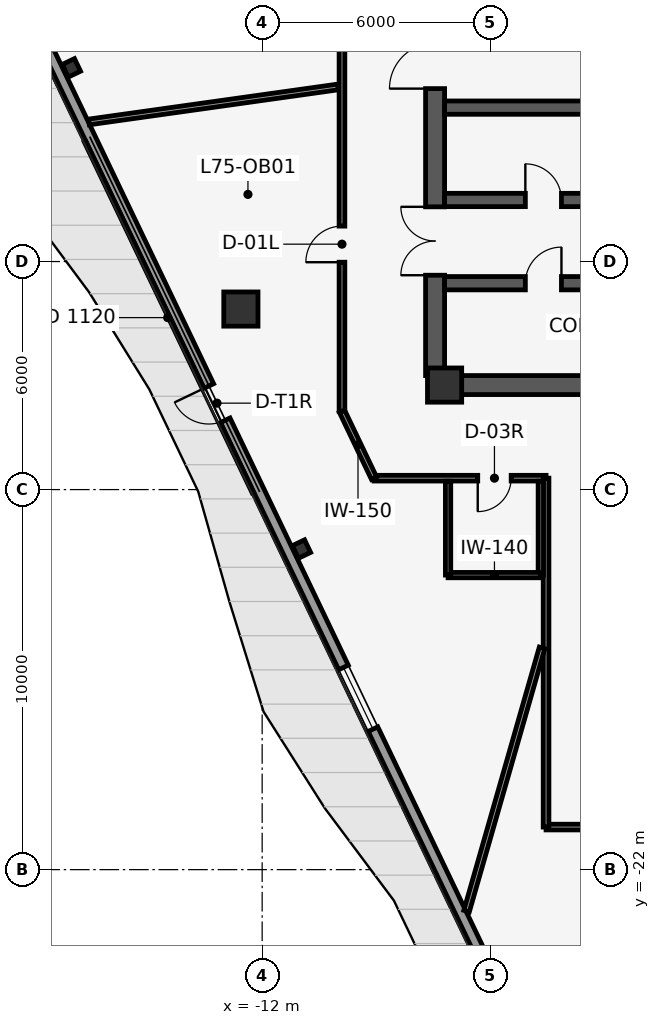
"""IFC4 building model, lengths in metres.
Left out: names, types, materials, properties, quantities, classifications, styles, units other than length and angle.
Written with IfcOpenShell. Run it as: python <this file> out.ifc"""

import sys

from ifc_helpers import new_model, si_unit, direction, frame, frame_2d, origin, origin_2d, place, context, subcontext, project, spatial, rectangle, i_section, extrude, element, fill, save


model = new_model("IFC4")
c1 = context("Model", 3, precision=1e-05, world=origin(), true_north=direction((0.0, 1.0)))
c2 = subcontext(c1, "Body", "Model", "MODEL_VIEW")
j1 = project(units=[si_unit("LENGTHUNIT", "METRE"), si_unit("PLANEANGLEUNIT", "RADIAN")], contexts=[c1])
p1 = place(None, origin())
s1 = spatial("IfcSite", under=j1, at=p1, CompositionType="ELEMENT")
p2 = place(p1, origin())
s2 = spatial("IfcBuilding", under=s1, at=p2, CompositionType="ELEMENT")
p3 = place(p2, frame((0.0, 0.0, 318.8)))
s3 = spatial("IfcBuildingStorey", under=s2, at=p3, CompositionType="ELEMENT", Elevation=318.8)
p4 = place(p3, frame((-7.45, -9.0, 0.0), z_axis=(0.0, 0.0, 1.0), x_axis=(0.0, 1.0, 0.0)))
e1 = element("IfcWall", 1, at=p4, inside=s3, PredefinedType="SHEAR", context=c2, shape_type="SweptSolid", body=[
    extrude(rectangle(XDim=9.1, YDim=0.5, at=frame_2d((4.55, 0.0))), origin(), (0.0, 0.0, 1.0), 4.32),
])
p5 = place(p4, frame((2.64, 0.0, 0.0)))
e2 = element("IfcOpeningElement", 2, at=p5, cuts=e1, PredefinedType="OPENING", context=c2, shape_type="SweptSolid", body=[
    extrude(rectangle(XDim=1.8, YDim=2.2, at=frame_2d((0.9, 1.1))), frame((0.0, 0.26, 0.0), z_axis=(0.0, -1.0, 0.0), x_axis=(1.0, 0.0, 0.0)), (0.0, 0.0, 1.0), 0.52),
])
p6 = place(p4, frame((7.55, 0.0, 0.0)))
e3 = element("IfcOpeningElement", 3, at=p6, cuts=e1, PredefinedType="OPENING", context=c2, shape_type="SweptSolid", body=[
    extrude(rectangle(XDim=1.2, YDim=2.15, at=frame_2d((0.6, 1.075))), frame((0.0, 0.26, 0.0), z_axis=(0.0, -1.0, 0.0), x_axis=(1.0, 0.0, 0.0)), (0.0, 0.0, 1.0), 0.52),
])
p7 = place(p3, frame((-7.45, -9.25, 0.0), z_axis=(0.0, 0.0, 1.0), x_axis=(1.0, 0.0, 0.0)))
e4 = element("IfcWall", 4, at=p7, inside=s3, PredefinedType="SHEAR", context=c2, shape_type="SweptSolid", body=[
    extrude(rectangle(XDim=14.9, YDim=0.5, at=frame_2d((7.45, 0.0))), origin(), (0.0, 0.0, 1.0), 4.32),
])
p8 = place(p3, frame((-7.2, -1.95, 0.0), z_axis=(0.0, 0.0, 1.0), x_axis=(1.0, 0.0, 0.0)))
e5 = element("IfcWall", 5, at=p8, inside=s3, PredefinedType="SHEAR", context=c2, shape_type="SweptSolid", body=[
    extrude(rectangle(XDim=14.4, YDim=0.35, at=frame_2d((7.2, 0.0))), origin(), (0.0, 0.0, 1.0), 4.32),
])
p9 = place(p3, frame((-7.2, -4.38, 0.0), z_axis=(0.0, 0.0, 1.0), x_axis=(1.0, 0.0, 0.0)))
e6 = element("IfcWall", 6, at=p9, inside=s3, PredefinedType="SHEAR", context=c2, shape_type="SweptSolid", body=[
    extrude(rectangle(XDim=14.4, YDim=0.35, at=frame_2d((7.2, 0.0))), origin(), (0.0, 0.0, 1.0), 4.32),
])
p10 = place(p9, frame((2.125, 0.0, 0.0)))
e7 = element("IfcOpeningElement", 7, at=p10, cuts=e6, PredefinedType="OPENING", context=c2, shape_type="SweptSolid", body=[
    extrude(rectangle(XDim=0.95, YDim=2.15, at=frame_2d((0.475, 1.075))), frame((0.0, 0.185, 0.0), z_axis=(0.0, -1.0, 0.0), x_axis=(1.0, 0.0, 0.0)), (0.0, 0.0, 1.0), 0.37),
])
p11 = place(p3, frame((-7.2, -6.57, 0.0), z_axis=(0.0, 0.0, 1.0), x_axis=(1.0, 0.0, 0.0)))
e8 = element("IfcWall", 8, at=p11, inside=s3, PredefinedType="SHEAR", context=c2, shape_type="SweptSolid", body=[
    extrude(rectangle(XDim=14.4, YDim=0.35, at=frame_2d((7.2, 0.0))), origin(), (0.0, 0.0, 1.0), 4.32),
])
p12 = place(p11, frame((9.05, 0.0, 0.0)))
e9 = element("IfcOpeningElement", 9, at=p12, cuts=e8, PredefinedType="OPENING", context=c2, shape_type="SweptSolid", body=[
    extrude(rectangle(XDim=1.2, YDim=2.25, at=frame_2d((0.6, 1.125))), frame((0.0, 0.185, 0.0), z_axis=(0.0, -1.0, 0.0), x_axis=(1.0, 0.0, 0.0)), (0.0, 0.0, 1.0), 0.37),
])
p13 = place(p11, frame((10.85, 0.0, 0.0)))
e10 = element("IfcOpeningElement", 10, at=p13, cuts=e8, PredefinedType="OPENING", context=c2, shape_type="SweptSolid", body=[
    extrude(rectangle(XDim=1.2, YDim=2.25, at=frame_2d((0.6, 1.125))), frame((0.0, 0.185, 0.0), z_axis=(0.0, -1.0, 0.0), x_axis=(1.0, 0.0, 0.0)), (0.0, 0.0, 1.0), 0.37),
])
p14 = place(p11, frame((2.125, 0.0, 0.0)))
e11 = element("IfcOpeningElement", 11, at=p14, cuts=e8, PredefinedType="OPENING", context=c2, shape_type="SweptSolid", body=[
    extrude(rectangle(XDim=0.95, YDim=2.15, at=frame_2d((0.475, 1.075))), frame((0.0, 0.185, 0.0), z_axis=(0.0, -1.0, 0.0), x_axis=(1.0, 0.0, 0.0)), (0.0, 0.0, 1.0), 0.37),
])
p15 = place(p11, frame((12.91, 0.0, 0.0)))
e12 = element("IfcOpeningElement", 12, at=p15, cuts=e8, PredefinedType="OPENING", context=c2, shape_type="SweptSolid", body=[
    extrude(rectangle(XDim=0.88, YDim=2.15, at=frame_2d((0.44, 1.075))), frame((0.0, 0.185, 0.0), z_axis=(0.0, -1.0, 0.0), x_axis=(1.0, 0.0, 0.0)), (0.0, 0.0, 1.0), 0.37),
])
for number, where, z_axis, x_axis in (
    (13, (-7.2, -9.25, 0.0), (0.0, 0.0, 1.0), (1.0, 0.0, 0.0)),
    (14, (-12.56, -7.25, 0.0), (0.0, 0.0, 1.0), (1.0, 0.0, 0.0)),
):
    element("IfcColumn", number, at=place(p3, frame(where, z_axis=z_axis, x_axis=x_axis)), inside=s3, PredefinedType="COLUMN", context=c2, shape_type="SweptSolid", body=[
        extrude(rectangle(XDim=0.9, YDim=0.9, at=origin_2d()), origin(), (0.0, 0.0, 1.0), 4.6),
    ])
for number, where, z_axis, x_axis in (
    (15, (-17.019, -0.903, 0.0), (0.0, 0.0, 1.0), (-0.431, 0.902, 0.0)),
    (16, (-10.966, -13.565, 0.0), (0.0, 0.0, 1.0), (-0.431, 0.902, 0.0)),
):
    element("IfcColumn", number, at=place(p3, frame(where, z_axis=z_axis, x_axis=x_axis)), inside=s3, PredefinedType="COLUMN", context=c2, shape_type="SweptSolid", body=[
        extrude(i_section(OverallWidth=0.368, OverallDepth=0.356, WebThickness=0.011, FlangeThickness=0.018, at=origin_2d()), origin(), (0.0, 0.0, 1.0), 4.6),
    ])
p16 = place(p3, frame((-4.988, -26.865, 0.0), z_axis=(0.0, 0.0, 1.0), x_axis=(-0.431592936847, 0.902068476815, 0.0)))
e17 = element("IfcWall", 17, at=p16, inside=s3, PredefinedType="STANDARD", context=c2, shape_type="SweptSolid", body=[
    extrude(rectangle(XDim=43.18, YDim=0.28, at=frame_2d((21.59, 0.0))), origin(), (0.0, 0.0, 1.0), 4.32),
])
p17 = place(p16, frame((18.499, 0.0, 0.0)))
e18 = element("IfcOpeningElement", 18, at=p17, cuts=e17, PredefinedType="OPENING", context=c2, shape_type="SweptSolid", body=[
    extrude(rectangle(XDim=1.0, YDim=2.15, at=frame_2d((0.5, 1.075))), frame((0.0, 0.15, 0.0), z_axis=(0.0, -1.0, 0.0), x_axis=(1.0, 0.0, 0.0)), (0.0, 0.0, 1.0), 0.3),
])
p18 = place(p16, frame((9.49, 0.0, 0.85)))
e19 = element("IfcOpeningElement", 19, at=p18, cuts=e17, PredefinedType="OPENING", context=c2, shape_type="SweptSolid", body=[
    extrude(rectangle(XDim=1.8, YDim=2.4, at=frame_2d((0.9, 1.2))), frame((0.0, 0.15, 0.0), z_axis=(0.0, -1.0, 0.0), x_axis=(1.0, 0.0, 0.0)), (0.0, 0.0, 1.0), 0.3),
])
p19 = place(p16, frame((31.89, 0.0, 0.85)))
e20 = element("IfcOpeningElement", 20, at=p19, cuts=e17, PredefinedType="OPENING", context=c2, shape_type="SweptSolid", body=[
    extrude(rectangle(XDim=1.8, YDim=2.4, at=frame_2d((0.9, 1.2))), frame((0.0, 0.15, 0.0), z_axis=(0.0, -1.0, 0.0), x_axis=(1.0, 0.0, 0.0)), (0.0, 0.0, 1.0), 0.3),
])
p20 = place(p16, frame((37.49, 0.0, 0.85)))
e21 = element("IfcOpeningElement", 21, at=p20, cuts=e17, PredefinedType="OPENING", context=c2, shape_type="SweptSolid", body=[
    extrude(rectangle(XDim=1.8, YDim=2.4, at=frame_2d((0.9, 1.2))), frame((0.0, 0.15, 0.0), z_axis=(0.0, -1.0, 0.0), x_axis=(1.0, 0.0, 0.0)), (0.0, 0.0, 1.0), 0.3),
])
p21 = place(p3, frame((-4.53, -11.7, 0.0), z_axis=(0.0, 0.0, 1.0), x_axis=(-1.0, 0.0, 0.0)))
e22 = element("IfcWall", 22, at=p21, inside=s3, PredefinedType="PARTITIONING", context=c2, shape_type="SweptSolid", body=[
    extrude(rectangle(XDim=4.526, YDim=0.15, at=frame_2d((2.263, 0.0))), origin(), (0.0, 0.0, 1.0), 4.32),
])
p22 = place(p21, frame((0.918, 0.0, 0.0)))
e23 = element("IfcOpeningElement", 23, at=p22, cuts=e22, PredefinedType="OPENING", context=c2, shape_type="SweptSolid", body=[
    extrude(rectangle(XDim=0.88, YDim=2.1, at=frame_2d((0.44, 1.05))), frame((0.0, 0.085, 0.0), z_axis=(0.0, -1.0, 0.0), x_axis=(1.0, 0.0, 0.0)), (0.0, 0.0, 1.0), 0.17),
])
p23 = place(p3, frame((-9.056, -11.7, 0.0), z_axis=(0.0, 0.0, 1.0), x_axis=(-0.431605782187, 0.902062330875, 0.0)))
e24 = element("IfcWall", 24, at=p23, inside=s3, PredefinedType="PARTITIONING", context=c2, shape_type="SweptSolid", body=[
    extrude(rectangle(XDim=1.954, YDim=0.15, at=frame_2d((0.977, 0.0))), origin(), (0.0, 0.0, 1.0), 4.32),
])
p24 = place(p3, frame((-9.9, -9.937, 0.0), z_axis=(0.0, 0.0, 1.0), x_axis=(0.0, 1.0, 0.0)))
e25 = element("IfcWall", 25, at=p24, inside=s3, PredefinedType="PARTITIONING", context=c2, shape_type="SweptSolid", body=[
    extrude(rectangle(XDim=21.787, YDim=0.15, at=frame_2d((10.894, 0.0))), origin(), (0.0, 0.0, 1.0), 4.32),
])
p25 = place(p24, frame((3.919, 0.0, 0.0)))
e26 = element("IfcOpeningElement", 26, at=p25, cuts=e25, PredefinedType="OPENING", context=c2, shape_type="SweptSolid", body=[
    extrude(rectangle(XDim=0.95, YDim=2.15, at=frame_2d((0.475, 1.075))), frame((0.0, 0.085, 0.0), z_axis=(0.0, -1.0, 0.0), x_axis=(1.0, 0.0, 0.0)), (0.0, 0.0, 1.0), 0.17),
])
p26 = place(p24, frame((14.558, 0.0, 0.0)))
e27 = element("IfcOpeningElement", 27, at=p26, cuts=e25, PredefinedType="OPENING", context=c2, shape_type="SweptSolid", body=[
    extrude(rectangle(XDim=0.95, YDim=2.15, at=frame_2d((0.475, 1.075))), frame((0.0, 0.085, 0.0), z_axis=(0.0, -1.0, 0.0), x_axis=(1.0, 0.0, 0.0)), (0.0, 0.0, 1.0), 0.17),
])
p27 = place(p3, frame((-2.22, -20.88, 0.0), z_axis=(0.0, 0.0, 1.0), x_axis=(-1.0, 0.0, 0.0)))
e28 = element("IfcWall", 28, at=p27, inside=s3, PredefinedType="PARTITIONING", context=c2, shape_type="SweptSolid", body=[
    extrude(rectangle(XDim=2.31, YDim=0.15, at=frame_2d((1.155, 0.0))), origin(), (0.0, 0.0, 1.0), 4.32),
])
p28 = place(p3, frame((-4.53, -20.88, 0.0), z_axis=(0.0, 0.0, 1.0), x_axis=(0.0, 1.0, 0.0)))
e29 = element("IfcWall", 29, at=p28, inside=s3, PredefinedType="PARTITIONING", context=c2, shape_type="SweptSolid", body=[
    extrude(rectangle(XDim=9.18, YDim=0.15, at=frame_2d((4.59, 0.0))), origin(), (0.0, 0.0, 1.0), 4.32),
])
p29 = place(p3, frame((-10.005, -1.406, 0.0), z_axis=(0.0, 0.0, 1.0), x_axis=(-0.99026508468, -0.139194332007, 0.0)))
e30 = element("IfcWall", 30, at=p29, inside=s3, PredefinedType="PARTITIONING", context=c2, shape_type="SweptSolid", body=[
    extrude(rectangle(XDim=6.616, YDim=0.15, at=frame_2d((3.308, 0.0))), origin(), (0.0, 0.0, 1.0), 4.32),
])
p30 = place(p3, frame((-4.635, -16.164, 0.0), z_axis=(0.0, 0.0, 1.0), x_axis=(-0.275624824413, -0.961265289172, 0.0)))
e31 = element("IfcWall", 31, at=p30, inside=s3, PredefinedType="PARTITIONING", context=c2, shape_type="SweptSolid", body=[
    extrude(rectangle(XDim=7.207, YDim=0.15, at=frame_2d((3.603, 0.0))), origin(), (0.0, 0.0, 1.0), 4.32),
])
p31 = place(p3, frame((-4.668, -11.78, 0.0), z_axis=(0.0, 0.0, 1.0), x_axis=(0.0, -1.0, 0.0)))
e32 = element("IfcWall", 32, at=p31, inside=s3, PredefinedType="PARTITIONING", context=c2, shape_type="SweptSolid", body=[
    extrude(rectangle(XDim=2.47, YDim=0.14, at=frame_2d((1.235, 0.0))), origin(), (0.0, 0.0, 1.0), 4.32),
])
p32 = place(p3, frame((-4.668, -14.25, 0.0), z_axis=(0.0, 0.0, 1.0), x_axis=(-1.0, 0.0, 0.0)))
e33 = element("IfcWall", 33, at=p32, inside=s3, PredefinedType="PARTITIONING", context=c2, shape_type="SweptSolid", body=[
    extrude(rectangle(XDim=2.44, YDim=0.14, at=frame_2d((1.22, 0.0))), origin(), (0.0, 0.0, 1.0), 4.32),
])
p33 = place(p3, frame((-7.108, -14.25, 0.0), z_axis=(0.0, 0.0, 1.0), x_axis=(0.0, 1.0, 0.0)))
e34 = element("IfcWall", 34, at=p33, inside=s3, PredefinedType="PARTITIONING", context=c2, shape_type="SweptSolid", body=[
    extrude(rectangle(XDim=2.47, YDim=0.14, at=frame_2d((1.235, 0.0))), origin(), (0.0, 0.0, 1.0), 4.32),
])
p34 = place(p17, origin())
e35 = element("IfcDoor", 35, at=p34, inside=s3, OperationType="SINGLE_SWING_RIGHT", PredefinedType="DOOR", context=c2, shape_type="SweptSolid", body=[
    extrude(rectangle(XDim=1.0, YDim=2.15, at=frame_2d((0.5, 1.075))), frame((0.0, 0.025, 0.0), z_axis=(0.0, -1.0, 0.0), x_axis=(1.0, 0.0, 0.0)), (0.0, 0.0, 1.0), 0.05),
])
fill(e18, e35)
p35 = place(p18, origin())
e36 = element("IfcWindow", 36, at=p35, inside=s3, PartitioningType="DOUBLE_PANEL_VERTICAL", PredefinedType="WINDOW", context=c2, shape_type="SweptSolid", body=[
    extrude(rectangle(XDim=1.8, YDim=2.4, at=frame_2d((0.9, 1.2))), frame((0.0, 0.03, 0.0), z_axis=(0.0, -1.0, 0.0), x_axis=(1.0, 0.0, 0.0)), (0.0, 0.0, 1.0), 0.06),
])
fill(e19, e36)
p36 = place(p5, origin())
e37 = element("IfcDoor", 37, at=p36, inside=s3, OperationType="DOUBLE_DOOR_SINGLE_SWING", PredefinedType="DOOR", context=c2, shape_type="SweptSolid", body=[
    extrude(rectangle(XDim=1.8, YDim=2.2, at=frame_2d((0.9, 1.1))), frame((0.0, 0.025, 0.0), z_axis=(0.0, -1.0, 0.0), x_axis=(1.0, 0.0, 0.0)), (0.0, 0.0, 1.0), 0.05),
])
fill(e2, e37)
p37 = place(p6, origin())
e38 = element("IfcDoor", 38, at=p37, inside=s3, OperationType="SINGLE_SWING_LEFT", PredefinedType="DOOR", context=c2, shape_type="SweptSolid", body=[
    extrude(rectangle(XDim=1.2, YDim=2.15, at=frame_2d((0.6, 1.075))), frame((0.0, 0.025, 0.0), z_axis=(0.0, -1.0, 0.0), x_axis=(1.0, 0.0, 0.0)), (0.0, 0.0, 1.0), 0.05),
])
fill(e3, e38)
p38 = place(p10, origin())
e39 = element("IfcDoor", 39, at=p38, inside=s3, OperationType="SINGLE_SWING_LEFT", PredefinedType="DOOR", context=c2, shape_type="SweptSolid", body=[
    extrude(rectangle(XDim=0.95, YDim=2.15, at=frame_2d((0.475, 1.075))), frame((0.0, 0.025, 0.0), z_axis=(0.0, -1.0, 0.0), x_axis=(1.0, 0.0, 0.0)), (0.0, 0.0, 1.0), 0.05),
])
fill(e7, e39)
p39 = place(p14, origin())
e40 = element("IfcDoor", 40, at=p39, inside=s3, OperationType="SINGLE_SWING_RIGHT", PredefinedType="DOOR", context=c2, shape_type="SweptSolid", body=[
    extrude(rectangle(XDim=0.95, YDim=2.15, at=frame_2d((0.475, 1.075))), frame((0.0, 0.025, 0.0), z_axis=(0.0, -1.0, 0.0), x_axis=(1.0, 0.0, 0.0)), (0.0, 0.0, 1.0), 0.05),
])
fill(e11, e40)
p40 = place(p22, origin())
e41 = element("IfcDoor", 41, at=p40, inside=s3, OperationType="SINGLE_SWING_RIGHT", PredefinedType="DOOR", context=c2, shape_type="SweptSolid", body=[
    extrude(rectangle(XDim=0.88, YDim=2.1, at=frame_2d((0.44, 1.05))), frame((0.0, 0.025, 0.0), z_axis=(0.0, -1.0, 0.0), x_axis=(1.0, 0.0, 0.0)), (0.0, 0.0, 1.0), 0.05),
])
fill(e23, e41)
p41 = place(p25, origin())
e42 = element("IfcDoor", 42, at=p41, inside=s3, OperationType="SINGLE_SWING_LEFT", PredefinedType="DOOR", context=c2, shape_type="SweptSolid", body=[
    extrude(rectangle(XDim=0.95, YDim=2.15, at=frame_2d((0.475, 1.075))), frame((0.0, 0.025, 0.0), z_axis=(0.0, -1.0, 0.0), x_axis=(1.0, 0.0, 0.0)), (0.0, 0.0, 1.0), 0.05),
])
fill(e26, e42)
save(model, sys.argv[1])
